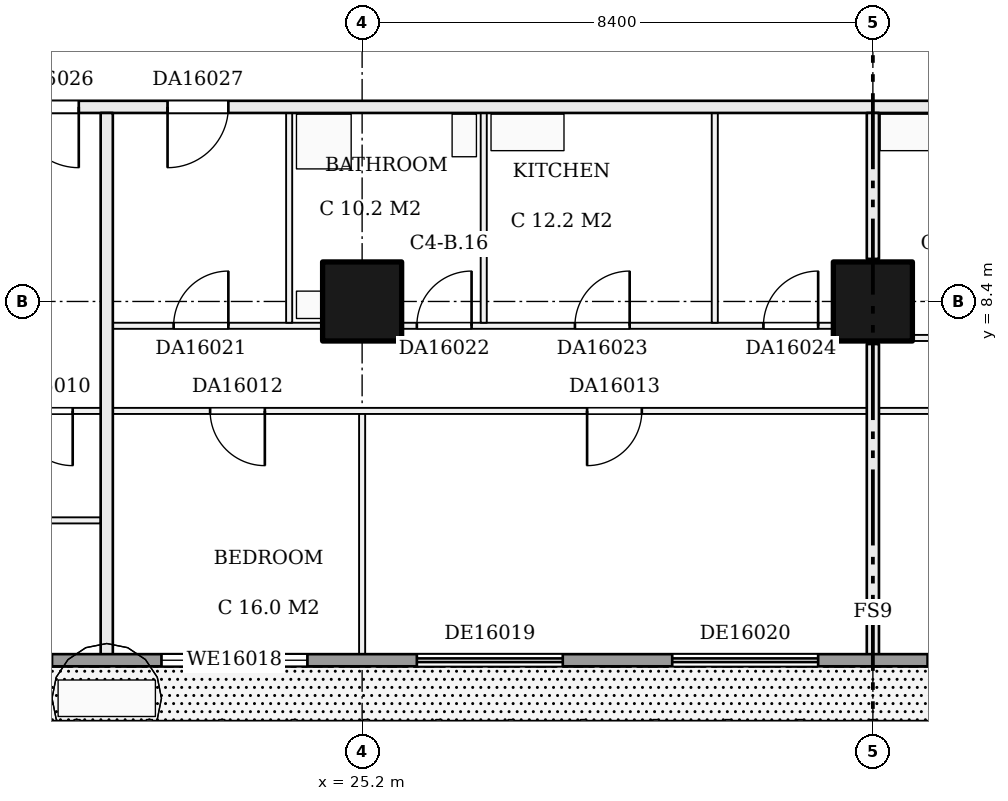
"""IFC4 building model, lengths in metres.
Left out: names, types, materials, properties, quantities, classifications, styles, units other than length and angle.
Written with IfcOpenShell. Run it as: python <this file> out.ifc"""

import sys

from ifc_helpers import new_model, si_unit, direction, frame, frame_2d, origin, origin_2d, place, context, subcontext, project, spatial, rectangle, extrude, element, fill, save


model = new_model("IFC4")
c1 = context("Model", 3, precision=1e-05, world=origin(), true_north=direction((0.0, 1.0)))
c2 = subcontext(c1, "Body", "Model", "MODEL_VIEW")
j1 = project(units=[si_unit("LENGTHUNIT", "METRE"), si_unit("PLANEANGLEUNIT", "RADIAN")], contexts=[c1])
p1 = place(None, origin())
s1 = spatial("IfcSite", under=j1, at=p1, CompositionType="ELEMENT")
p2 = place(p1, origin())
s2 = spatial("IfcBuilding", under=s1, at=p2, CompositionType="ELEMENT")
p3 = place(p2, frame((0.0, 0.0, 67.2)))
s3 = spatial("IfcBuildingStorey", under=s2, at=p3, CompositionType="ELEMENT", Elevation=67.2)
for number, where, z_axis, x_axis in (
    (1, (25.2, 8.4, 0.0), (0.0, 0.0, 1.0), (1.0, 0.0, 0.0)),
    (2, (33.6, 8.4, 0.0), (0.0, 0.0, 1.0), (1.0, 0.0, 0.0)),
):
    element("IfcColumn", number, at=place(p3, frame(where, z_axis=z_axis, x_axis=x_axis)), inside=s3, PredefinedType="COLUMN", context=c2, shape_type="SweptSolid", body=[
        extrude(rectangle(XDim=1.3, YDim=1.3, at=origin_2d()), origin(), (0.0, 0.0, 1.0), 3.22),
    ])
p4 = place(p3, frame((16.9, 4.8, 0.0), z_axis=(0.0, 0.0, 1.0), x_axis=(1.0, 0.0, 0.0)))
e3 = element("IfcWall", 3, at=p4, inside=s3, PredefinedType="PARTITIONING", context=c2, shape_type="SweptSolid", body=[
    extrude(rectangle(XDim=4.0, YDim=0.1, at=frame_2d((2.0, 0.0))), origin(), (0.0, 0.0, 1.0), 3.22),
])
p5 = place(p4, frame((1.5, 0.0, 0.0)))
e4 = element("IfcOpeningElement", 4, at=p5, cuts=e3, PredefinedType="OPENING", context=c2, shape_type="SweptSolid", body=[
    extrude(rectangle(XDim=0.9, YDim=2.1, at=frame_2d((0.45, 1.05))), frame((0.0, 0.06, 0.0), z_axis=(0.0, -1.0, 0.0), x_axis=(1.0, 0.0, 0.0)), (0.0, 0.0, 1.0), 0.12),
])
p6 = place(p3, frame((12.65, 6.6, 0.0), z_axis=(0.0, 0.0, 1.0), x_axis=(1.0, 0.0, 0.0)))
e5 = element("IfcWall", 5, at=p6, inside=s3, PredefinedType="PARTITIONING", context=c2, shape_type="SweptSolid", body=[
    extrude(rectangle(XDim=29.25, YDim=0.1, at=frame_2d((14.625, 0.0))), origin(), (0.0, 0.0, 1.0), 3.22),
])
p7 = place(p6, frame((1.65, 0.0, 0.0)))
e6 = element("IfcOpeningElement", 6, at=p7, cuts=e5, PredefinedType="OPENING", context=c2, shape_type="SweptSolid", body=[
    extrude(rectangle(XDim=0.9, YDim=2.1, at=frame_2d((0.45, 1.05))), frame((0.0, 0.06, 0.0), z_axis=(0.0, -1.0, 0.0), x_axis=(1.0, 0.0, 0.0)), (0.0, 0.0, 1.0), 0.12),
])
p8 = place(p6, frame((6.89, 0.0, 0.0)))
e7 = element("IfcOpeningElement", 7, at=p8, cuts=e5, PredefinedType="OPENING", context=c2, shape_type="SweptSolid", body=[
    extrude(rectangle(XDim=0.9, YDim=2.1, at=frame_2d((0.45, 1.05))), frame((0.0, 0.06, 0.0), z_axis=(0.0, -1.0, 0.0), x_axis=(1.0, 0.0, 0.0)), (0.0, 0.0, 1.0), 0.12),
])
p9 = place(p6, frame((4.85, 0.0, 0.0)))
e8 = element("IfcOpeningElement", 8, at=p9, cuts=e5, PredefinedType="OPENING", context=c2, shape_type="SweptSolid", body=[
    extrude(rectangle(XDim=0.9, YDim=2.1, at=frame_2d((0.45, 1.05))), frame((0.0, 0.06, 0.0), z_axis=(0.0, -1.0, 0.0), x_axis=(1.0, 0.0, 0.0)), (0.0, 0.0, 1.0), 0.12),
])
p10 = place(p6, frame((10.05, 0.0, 0.0)))
e9 = element("IfcOpeningElement", 9, at=p10, cuts=e5, PredefinedType="OPENING", context=c2, shape_type="SweptSolid", body=[
    extrude(rectangle(XDim=0.9, YDim=2.1, at=frame_2d((0.45, 1.05))), frame((0.0, 0.06, 0.0), z_axis=(0.0, -1.0, 0.0), x_axis=(1.0, 0.0, 0.0)), (0.0, 0.0, 1.0), 0.12),
])
p11 = place(p6, frame((16.25, 0.0, 0.0)))
e10 = element("IfcOpeningElement", 10, at=p11, cuts=e5, PredefinedType="OPENING", context=c2, shape_type="SweptSolid", body=[
    extrude(rectangle(XDim=0.9, YDim=2.1, at=frame_2d((0.45, 1.05))), frame((0.0, 0.06, 0.0), z_axis=(0.0, -1.0, 0.0), x_axis=(1.0, 0.0, 0.0)), (0.0, 0.0, 1.0), 0.12),
])
p12 = place(p6, frame((22.55, 0.0, 0.0)))
e11 = element("IfcOpeningElement", 11, at=p12, cuts=e5, PredefinedType="OPENING", context=c2, shape_type="SweptSolid", body=[
    extrude(rectangle(XDim=0.9, YDim=2.1, at=frame_2d((0.45, 1.05))), frame((0.0, 0.06, 0.0), z_axis=(0.0, -1.0, 0.0), x_axis=(1.0, 0.0, 0.0)), (0.0, 0.0, 1.0), 0.12),
])
p13 = place(p6, frame((26.75, 0.0, 0.0)))
e12 = element("IfcOpeningElement", 12, at=p13, cuts=e5, PredefinedType="OPENING", context=c2, shape_type="SweptSolid", body=[
    extrude(rectangle(XDim=0.9, YDim=2.1, at=frame_2d((0.45, 1.05))), frame((0.0, 0.06, 0.0), z_axis=(0.0, -1.0, 0.0), x_axis=(1.0, 0.0, 0.0)), (0.0, 0.0, 1.0), 0.12),
])
p14 = place(p3, frame((33.7, 7.8, 0.0), z_axis=(0.0, 0.0, 1.0), x_axis=(1.0, 0.0, 0.0)))
e13 = element("IfcWall", 13, at=p14, inside=s3, PredefinedType="PARTITIONING", context=c2, shape_type="SweptSolid", body=[
    extrude(rectangle(XDim=8.2, YDim=0.1, at=frame_2d((4.1, 0.0))), origin(), (0.0, 0.0, 1.0), 3.22),
])
p15 = place(p14, frame((6.633, 0.0, 0.0)))
e14 = element("IfcOpeningElement", 14, at=p15, cuts=e13, PredefinedType="OPENING", context=c2, shape_type="SweptSolid", body=[
    extrude(rectangle(XDim=0.9, YDim=2.1, at=frame_2d((0.45, 1.05))), frame((0.0, 0.06, 0.0), z_axis=(0.0, -1.0, 0.0), x_axis=(1.0, 0.0, 0.0)), (0.0, 0.0, 1.0), 0.12),
])
p16 = place(p14, frame((1.1, 0.0, 0.0)))
e15 = element("IfcOpeningElement", 15, at=p16, cuts=e13, PredefinedType="OPENING", context=c2, shape_type="SweptSolid", body=[
    extrude(rectangle(XDim=0.9, YDim=2.1, at=frame_2d((0.45, 1.05))), frame((0.0, 0.06, 0.0), z_axis=(0.0, -1.0, 0.0), x_axis=(1.0, 0.0, 0.0)), (0.0, 0.0, 1.0), 0.12),
])
p17 = place(p14, frame((4.067, 0.0, 0.0)))
e16 = element("IfcOpeningElement", 16, at=p17, cuts=e13, PredefinedType="OPENING", context=c2, shape_type="SweptSolid", body=[
    extrude(rectangle(XDim=0.9, YDim=2.1, at=frame_2d((0.45, 1.05))), frame((0.0, 0.06, 0.0), z_axis=(0.0, -1.0, 0.0), x_axis=(1.0, 0.0, 0.0)), (0.0, 0.0, 1.0), 0.12),
])
p18 = place(p3, frame((21.1, 8.0, 0.0), z_axis=(0.0, 0.0, 1.0), x_axis=(1.0, 0.0, 0.0)))
e17 = element("IfcWall", 17, at=p18, inside=s3, PredefinedType="PARTITIONING", context=c2, shape_type="SweptSolid", body=[
    extrude(rectangle(XDim=12.4, YDim=0.1, at=frame_2d((6.2, 0.0))), origin(), (0.0, 0.0, 1.0), 3.22),
])
p19 = place(p18, frame((1.0, 0.0, 0.0)))
e18 = element("IfcOpeningElement", 18, at=p19, cuts=e17, PredefinedType="OPENING", context=c2, shape_type="SweptSolid", body=[
    extrude(rectangle(XDim=0.9, YDim=2.1, at=frame_2d((0.45, 1.05))), frame((0.0, 0.06, 0.0), z_axis=(0.0, -1.0, 0.0), x_axis=(1.0, 0.0, 0.0)), (0.0, 0.0, 1.0), 0.12),
])
p20 = place(p18, frame((5.0, 0.0, 0.0)))
e19 = element("IfcOpeningElement", 19, at=p20, cuts=e17, PredefinedType="OPENING", context=c2, shape_type="SweptSolid", body=[
    extrude(rectangle(XDim=0.9, YDim=2.1, at=frame_2d((0.45, 1.05))), frame((0.0, 0.06, 0.0), z_axis=(0.0, -1.0, 0.0), x_axis=(1.0, 0.0, 0.0)), (0.0, 0.0, 1.0), 0.12),
])
p21 = place(p18, frame((7.6, 0.0, 0.0)))
e20 = element("IfcOpeningElement", 20, at=p21, cuts=e17, PredefinedType="OPENING", context=c2, shape_type="SweptSolid", body=[
    extrude(rectangle(XDim=0.9, YDim=2.1, at=frame_2d((0.45, 1.05))), frame((0.0, 0.06, 0.0), z_axis=(0.0, -1.0, 0.0), x_axis=(1.0, 0.0, 0.0)), (0.0, 0.0, 1.0), 0.12),
])
p22 = place(p18, frame((10.7, 0.0, 0.0)))
e21 = element("IfcOpeningElement", 21, at=p22, cuts=e17, PredefinedType="OPENING", context=c2, shape_type="SweptSolid", body=[
    extrude(rectangle(XDim=0.9, YDim=2.1, at=frame_2d((0.45, 1.05))), frame((0.0, 0.06, 0.0), z_axis=(0.0, -1.0, 0.0), x_axis=(1.0, 0.0, 0.0)), (0.0, 0.0, 1.0), 0.12),
])
p23 = place(p3, frame((11.5, 11.6, 0.0), z_axis=(0.0, 0.0, 1.0), x_axis=(1.0, 0.0, 0.0)))
e22 = element("IfcWall", 22, at=p23, inside=s3, PredefinedType="PARTITIONING", context=c2, shape_type="SweptSolid", body=[
    extrude(rectangle(XDim=30.5, YDim=0.2, at=frame_2d((15.25, 0.0))), origin(), (0.0, 0.0, 1.0), 3.22),
])
p24 = place(p23, frame((1.6, 0.0, 0.0)))
e23 = element("IfcOpeningElement", 23, at=p24, cuts=e22, PredefinedType="OPENING", context=c2, shape_type="SweptSolid", body=[
    extrude(rectangle(XDim=1.0, YDim=2.1, at=frame_2d((0.5, 1.05))), frame((0.0, 0.11, 0.0), z_axis=(0.0, -1.0, 0.0), x_axis=(1.0, 0.0, 0.0)), (0.0, 0.0, 1.0), 0.22),
])
p25 = place(p23, frame((8.04, 0.0, 0.0)))
e24 = element("IfcOpeningElement", 24, at=p25, cuts=e22, PredefinedType="OPENING", context=c2, shape_type="SweptSolid", body=[
    extrude(rectangle(XDim=1.0, YDim=2.1, at=frame_2d((0.5, 1.05))), frame((0.0, 0.11, 0.0), z_axis=(0.0, -1.0, 0.0), x_axis=(1.0, 0.0, 0.0)), (0.0, 0.0, 1.0), 0.22),
])
p26 = place(p23, frame((10.5, 0.0, 0.0)))
e25 = element("IfcOpeningElement", 25, at=p26, cuts=e22, PredefinedType="OPENING", context=c2, shape_type="SweptSolid", body=[
    extrude(rectangle(XDim=1.0, YDim=2.1, at=frame_2d((0.5, 1.05))), frame((0.0, 0.11, 0.0), z_axis=(0.0, -1.0, 0.0), x_axis=(1.0, 0.0, 0.0)), (0.0, 0.0, 1.0), 0.22),
])
p27 = place(p23, frame((28.733, 0.0, 0.0)))
e26 = element("IfcOpeningElement", 26, at=p27, cuts=e22, PredefinedType="OPENING", context=c2, shape_type="SweptSolid", body=[
    extrude(rectangle(XDim=1.0, YDim=2.1, at=frame_2d((0.5, 1.05))), frame((0.0, 0.11, 0.0), z_axis=(0.0, -1.0, 0.0), x_axis=(1.0, 0.0, 0.0)), (0.0, 0.0, 1.0), 0.22),
])
p28 = place(p3, frame((21.0, 2.5, 0.0), z_axis=(0.0, 0.0, 1.0), x_axis=(0.0, 1.0, 0.0)))
e27 = element("IfcWall", 27, at=p28, inside=s3, PredefinedType="PARTITIONING", context=c2, shape_type="SweptSolid", body=[
    extrude(rectangle(XDim=9.0, YDim=0.2, at=frame_2d((4.5, 0.0))), origin(), (0.0, 0.0, 1.0), 3.22),
])
p29 = place(p3, frame((24.0, 8.05, 0.0), z_axis=(0.0, 0.0, 1.0), x_axis=(0.0, 1.0, 0.0)))
e28 = element("IfcWall", 28, at=p29, inside=s3, PredefinedType="PARTITIONING", context=c2, shape_type="SweptSolid", body=[
    extrude(rectangle(XDim=3.45, YDim=0.1, at=frame_2d((1.725, 0.0))), origin(), (0.0, 0.0, 1.0), 3.22),
])
p30 = place(p3, frame((25.2, 2.5, 0.0), z_axis=(0.0, 0.0, 1.0), x_axis=(0.0, 1.0, 0.0)))
e29 = element("IfcWall", 29, at=p30, inside=s3, PredefinedType="PARTITIONING", context=c2, shape_type="SweptSolid", body=[
    extrude(rectangle(XDim=4.05, YDim=0.1, at=frame_2d((2.025, 0.0))), origin(), (0.0, 0.0, 1.0), 3.22),
])
for number, where, z_axis, x_axis in (
    (30, (27.2, 8.05, 0.0), (0.0, 0.0, 1.0), (0.0, 1.0, 0.0)),
    (31, (31.0, 8.05, 0.0), (0.0, 0.0, 1.0), (0.0, 1.0, 0.0)),
):
    element("IfcWall", number, at=place(p3, frame(where, z_axis=z_axis, x_axis=x_axis)), inside=s3, PredefinedType="PARTITIONING", context=c2, shape_type="SweptSolid", body=[
        extrude(rectangle(XDim=3.45, YDim=0.1, at=frame_2d((1.725, 0.0))), origin(), (0.0, 0.0, 1.0), 3.22),
    ])
p31 = place(p3, frame((33.6, 2.5, 0.0), z_axis=(0.0, 0.0, 1.0), x_axis=(0.0, 1.0, 0.0)))
e32 = element("IfcWall", 32, at=p31, inside=s3, PredefinedType="PARTITIONING", context=c2, shape_type="SweptSolid", body=[
    extrude(rectangle(XDim=5.2, YDim=0.2, at=frame_2d((2.6, 0.0))), origin(), (0.0, 0.0, 1.0), 3.22),
])
p32 = place(p3, frame((33.6, 9.1, 0.0), z_axis=(0.0, 0.0, 1.0), x_axis=(0.0, 1.0, 0.0)))
e33 = element("IfcWall", 33, at=p32, inside=s3, PredefinedType="PARTITIONING", context=c2, shape_type="SweptSolid", body=[
    extrude(rectangle(XDim=2.4, YDim=0.2, at=frame_2d((1.2, 0.0))), origin(), (0.0, 0.0, 1.0), 3.22),
])
p33 = place(p3, frame((4.8, 2.5, 0.0), z_axis=(0.0, 0.0, 1.0), x_axis=(1.0, 0.0, 0.0)))
e34 = element("IfcWall", 34, at=p33, inside=s3, PredefinedType="SOLIDWALL", context=c2, shape_type="SweptSolid", body=[
    extrude(rectangle(XDim=57.6, YDim=0.2, at=frame_2d((28.8, 0.0))), origin(), (0.0, 0.0, 1.0), 3.22),
])
p34 = place(p33, frame((0.3, 0.0, 0.0)))
e35 = element("IfcOpeningElement", 35, at=p34, cuts=e34, PredefinedType="OPENING", context=c2, shape_type="SweptSolid", body=[
    extrude(rectangle(XDim=2.4, YDim=2.2, at=frame_2d((1.2, 1.1))), frame((0.0, 0.11, 0.0), z_axis=(0.0, -1.0, 0.0), x_axis=(1.0, 0.0, 0.0)), (0.0, 0.0, 1.0), 0.22),
])
p35 = place(p33, frame((4.5, 0.0, 0.9)))
e36 = element("IfcOpeningElement", 36, at=p35, cuts=e34, PredefinedType="OPENING", context=c2, shape_type="SweptSolid", body=[
    extrude(rectangle(XDim=2.4, YDim=1.5, at=frame_2d((1.2, 0.75))), frame((0.0, 0.11, 0.0), z_axis=(0.0, -1.0, 0.0), x_axis=(1.0, 0.0, 0.0)), (0.0, 0.0, 1.0), 0.22),
])
p36 = place(p33, frame((8.7, 0.0, 0.9)))
e37 = element("IfcOpeningElement", 37, at=p36, cuts=e34, PredefinedType="OPENING", context=c2, shape_type="SweptSolid", body=[
    extrude(rectangle(XDim=2.4, YDim=1.5, at=frame_2d((1.2, 0.75))), frame((0.0, 0.11, 0.0), z_axis=(0.0, -1.0, 0.0), x_axis=(1.0, 0.0, 0.0)), (0.0, 0.0, 1.0), 0.22),
])
p37 = place(p33, frame((12.9, 0.0, 0.0)))
e38 = element("IfcOpeningElement", 38, at=p37, cuts=e34, PredefinedType="OPENING", context=c2, shape_type="SweptSolid", body=[
    extrude(rectangle(XDim=2.4, YDim=2.2, at=frame_2d((1.2, 1.1))), frame((0.0, 0.11, 0.0), z_axis=(0.0, -1.0, 0.0), x_axis=(1.0, 0.0, 0.0)), (0.0, 0.0, 1.0), 0.22),
])
p38 = place(p33, frame((17.1, 0.0, 0.9)))
e39 = element("IfcOpeningElement", 39, at=p38, cuts=e34, PredefinedType="OPENING", context=c2, shape_type="SweptSolid", body=[
    extrude(rectangle(XDim=2.4, YDim=1.5, at=frame_2d((1.2, 0.75))), frame((0.0, 0.11, 0.0), z_axis=(0.0, -1.0, 0.0), x_axis=(1.0, 0.0, 0.0)), (0.0, 0.0, 1.0), 0.22),
])
p39 = place(p33, frame((21.3, 0.0, 0.0)))
e40 = element("IfcOpeningElement", 40, at=p39, cuts=e34, PredefinedType="OPENING", context=c2, shape_type="SweptSolid", body=[
    extrude(rectangle(XDim=2.4, YDim=2.2, at=frame_2d((1.2, 1.1))), frame((0.0, 0.11, 0.0), z_axis=(0.0, -1.0, 0.0), x_axis=(1.0, 0.0, 0.0)), (0.0, 0.0, 1.0), 0.22),
])
p40 = place(p33, frame((25.5, 0.0, 0.0)))
e41 = element("IfcOpeningElement", 41, at=p40, cuts=e34, PredefinedType="OPENING", context=c2, shape_type="SweptSolid", body=[
    extrude(rectangle(XDim=2.4, YDim=2.2, at=frame_2d((1.2, 1.1))), frame((0.0, 0.11, 0.0), z_axis=(0.0, -1.0, 0.0), x_axis=(1.0, 0.0, 0.0)), (0.0, 0.0, 1.0), 0.22),
])
p41 = place(p33, frame((29.7, 0.0, 0.0)))
e42 = element("IfcOpeningElement", 42, at=p41, cuts=e34, PredefinedType="OPENING", context=c2, shape_type="SweptSolid", body=[
    extrude(rectangle(XDim=2.4, YDim=2.2, at=frame_2d((1.2, 1.1))), frame((0.0, 0.11, 0.0), z_axis=(0.0, -1.0, 0.0), x_axis=(1.0, 0.0, 0.0)), (0.0, 0.0, 1.0), 0.22),
])
p42 = place(p33, frame((33.9, 0.0, 0.9)))
e43 = element("IfcOpeningElement", 43, at=p42, cuts=e34, PredefinedType="OPENING", context=c2, shape_type="SweptSolid", body=[
    extrude(rectangle(XDim=2.4, YDim=1.5, at=frame_2d((1.2, 0.75))), frame((0.0, 0.11, 0.0), z_axis=(0.0, -1.0, 0.0), x_axis=(1.0, 0.0, 0.0)), (0.0, 0.0, 1.0), 0.22),
])
p43 = place(p33, frame((38.1, 0.0, 0.0)))
e44 = element("IfcOpeningElement", 44, at=p43, cuts=e34, PredefinedType="OPENING", context=c2, shape_type="SweptSolid", body=[
    extrude(rectangle(XDim=2.4, YDim=2.2, at=frame_2d((1.2, 1.1))), frame((0.0, 0.11, 0.0), z_axis=(0.0, -1.0, 0.0), x_axis=(1.0, 0.0, 0.0)), (0.0, 0.0, 1.0), 0.22),
])
p44 = place(p33, frame((42.3, 0.0, 0.9)))
e45 = element("IfcOpeningElement", 45, at=p44, cuts=e34, PredefinedType="OPENING", context=c2, shape_type="SweptSolid", body=[
    extrude(rectangle(XDim=2.4, YDim=1.5, at=frame_2d((1.2, 0.75))), frame((0.0, 0.11, 0.0), z_axis=(0.0, -1.0, 0.0), x_axis=(1.0, 0.0, 0.0)), (0.0, 0.0, 1.0), 0.22),
])
p45 = place(p33, frame((46.5, 0.0, 0.9)))
e46 = element("IfcOpeningElement", 46, at=p45, cuts=e34, PredefinedType="OPENING", context=c2, shape_type="SweptSolid", body=[
    extrude(rectangle(XDim=2.4, YDim=1.5, at=frame_2d((1.2, 0.75))), frame((0.0, 0.11, 0.0), z_axis=(0.0, -1.0, 0.0), x_axis=(1.0, 0.0, 0.0)), (0.0, 0.0, 1.0), 0.22),
])
p46 = place(p33, frame((50.7, 0.0, 0.0)))
e47 = element("IfcOpeningElement", 47, at=p46, cuts=e34, PredefinedType="OPENING", context=c2, shape_type="SweptSolid", body=[
    extrude(rectangle(XDim=2.4, YDim=2.2, at=frame_2d((1.2, 1.1))), frame((0.0, 0.11, 0.0), z_axis=(0.0, -1.0, 0.0), x_axis=(1.0, 0.0, 0.0)), (0.0, 0.0, 1.0), 0.22),
])
p47 = place(p33, frame((54.9, 0.0, 0.9)))
e48 = element("IfcOpeningElement", 48, at=p47, cuts=e34, PredefinedType="OPENING", context=c2, shape_type="SweptSolid", body=[
    extrude(rectangle(XDim=2.4, YDim=1.5, at=frame_2d((1.2, 0.75))), frame((0.0, 0.11, 0.0), z_axis=(0.0, -1.0, 0.0), x_axis=(1.0, 0.0, 0.0)), (0.0, 0.0, 1.0), 0.22),
])
p48 = place(p8, frame((0.9, 0.0, 0.0), z_axis=(0.0, 0.0, 1.0), x_axis=(-1.0, 0.0, 0.0)))
e49 = element("IfcDoor", 49, at=p48, inside=s3, OperationType="SINGLE_SWING_LEFT", PredefinedType="DOOR", context=c2, shape_type="SweptSolid", body=[
    extrude(rectangle(XDim=0.9, YDim=2.1, at=frame_2d((0.45, 1.05))), frame((0.0, 0.025, 0.0), z_axis=(0.0, -1.0, 0.0), x_axis=(1.0, 0.0, 0.0)), (0.0, 0.0, 1.0), 0.05),
])
fill(e7, e49)
p49 = place(p10, frame((0.9, 0.0, 0.0), z_axis=(0.0, 0.0, 1.0), x_axis=(-1.0, 0.0, 0.0)))
e50 = element("IfcDoor", 50, at=p49, inside=s3, OperationType="SINGLE_SWING_LEFT", PredefinedType="DOOR", context=c2, shape_type="SweptSolid", body=[
    extrude(rectangle(XDim=0.9, YDim=2.1, at=frame_2d((0.45, 1.05))), frame((0.0, 0.025, 0.0), z_axis=(0.0, -1.0, 0.0), x_axis=(1.0, 0.0, 0.0)), (0.0, 0.0, 1.0), 0.05),
])
fill(e9, e50)
p50 = place(p11, frame((0.9, 0.0, 0.0), z_axis=(0.0, 0.0, 1.0), x_axis=(-1.0, 0.0, 0.0)))
e51 = element("IfcDoor", 51, at=p50, inside=s3, OperationType="SINGLE_SWING_RIGHT", PredefinedType="DOOR", context=c2, shape_type="SweptSolid", body=[
    extrude(rectangle(XDim=0.9, YDim=2.1, at=frame_2d((0.45, 1.05))), frame((0.0, 0.025, 0.0), z_axis=(0.0, -1.0, 0.0), x_axis=(1.0, 0.0, 0.0)), (0.0, 0.0, 1.0), 0.05),
])
fill(e10, e51)
p51 = place(p19, origin())
e52 = element("IfcDoor", 52, at=p51, inside=s3, OperationType="SINGLE_SWING_RIGHT", PredefinedType="DOOR", context=c2, shape_type="SweptSolid", body=[
    extrude(rectangle(XDim=0.9, YDim=2.1, at=frame_2d((0.45, 1.05))), frame((0.0, 0.025, 0.0), z_axis=(0.0, -1.0, 0.0), x_axis=(1.0, 0.0, 0.0)), (0.0, 0.0, 1.0), 0.05),
])
fill(e18, e52)
p52 = place(p20, origin())
e53 = element("IfcDoor", 53, at=p52, inside=s3, OperationType="SINGLE_SWING_RIGHT", PredefinedType="DOOR", context=c2, shape_type="SweptSolid", body=[
    extrude(rectangle(XDim=0.9, YDim=2.1, at=frame_2d((0.45, 1.05))), frame((0.0, 0.025, 0.0), z_axis=(0.0, -1.0, 0.0), x_axis=(1.0, 0.0, 0.0)), (0.0, 0.0, 1.0), 0.05),
])
fill(e19, e53)
p53 = place(p21, origin())
e54 = element("IfcDoor", 54, at=p53, inside=s3, OperationType="SINGLE_SWING_RIGHT", PredefinedType="DOOR", context=c2, shape_type="SweptSolid", body=[
    extrude(rectangle(XDim=0.9, YDim=2.1, at=frame_2d((0.45, 1.05))), frame((0.0, 0.025, 0.0), z_axis=(0.0, -1.0, 0.0), x_axis=(1.0, 0.0, 0.0)), (0.0, 0.0, 1.0), 0.05),
])
fill(e20, e54)
p54 = place(p22, origin())
e55 = element("IfcDoor", 55, at=p54, inside=s3, OperationType="SINGLE_SWING_RIGHT", PredefinedType="DOOR", context=c2, shape_type="SweptSolid", body=[
    extrude(rectangle(XDim=0.9, YDim=2.1, at=frame_2d((0.45, 1.05))), frame((0.0, 0.025, 0.0), z_axis=(0.0, -1.0, 0.0), x_axis=(1.0, 0.0, 0.0)), (0.0, 0.0, 1.0), 0.05),
])
fill(e21, e55)
p55 = place(p25, frame((1.0, 0.0, 0.0), z_axis=(0.0, 0.0, 1.0), x_axis=(-1.0, 0.0, 0.0)))
e56 = element("IfcDoor", 56, at=p55, inside=s3, OperationType="SINGLE_SWING_LEFT", PredefinedType="DOOR", context=c2, shape_type="SweptSolid", body=[
    extrude(rectangle(XDim=1.0, YDim=2.1, at=frame_2d((0.5, 1.05))), frame((0.0, 0.025, 0.0), z_axis=(0.0, -1.0, 0.0), x_axis=(1.0, 0.0, 0.0)), (0.0, 0.0, 1.0), 0.05),
])
fill(e24, e56)
p56 = place(p26, frame((1.0, 0.0, 0.0), z_axis=(0.0, 0.0, 1.0), x_axis=(-1.0, 0.0, 0.0)))
e57 = element("IfcDoor", 57, at=p56, inside=s3, OperationType="SINGLE_SWING_RIGHT", PredefinedType="DOOR", context=c2, shape_type="SweptSolid", body=[
    extrude(rectangle(XDim=1.0, YDim=2.1, at=frame_2d((0.5, 1.05))), frame((0.0, 0.025, 0.0), z_axis=(0.0, -1.0, 0.0), x_axis=(1.0, 0.0, 0.0)), (0.0, 0.0, 1.0), 0.05),
])
fill(e25, e57)
p57 = place(p38, origin())
e58 = element("IfcWindow", 58, at=p57, inside=s3, PartitioningType="SINGLE_PANEL", PredefinedType="WINDOW", context=c2, shape_type="SweptSolid", body=[
    extrude(rectangle(XDim=2.4, YDim=1.5, at=frame_2d((1.2, 0.75))), frame((0.0, 0.03, 0.0), z_axis=(0.0, -1.0, 0.0), x_axis=(1.0, 0.0, 0.0)), (0.0, 0.0, 1.0), 0.06),
])
fill(e39, e58)
p58 = place(p39, origin())
e59 = element("IfcDoor", 59, at=p58, inside=s3, OperationType="DOUBLE_DOOR_SLIDING", PredefinedType="DOOR", context=c2, shape_type="SweptSolid", body=[
    extrude(rectangle(XDim=2.4, YDim=2.2, at=frame_2d((1.2, 1.1))), frame((0.0, 0.025, 0.0), z_axis=(0.0, -1.0, 0.0), x_axis=(1.0, 0.0, 0.0)), (0.0, 0.0, 1.0), 0.05),
])
fill(e40, e59)
p59 = place(p40, origin())
e60 = element("IfcDoor", 60, at=p59, inside=s3, OperationType="DOUBLE_DOOR_SLIDING", PredefinedType="DOOR", context=c2, shape_type="SweptSolid", body=[
    extrude(rectangle(XDim=2.4, YDim=2.2, at=frame_2d((1.2, 1.1))), frame((0.0, 0.025, 0.0), z_axis=(0.0, -1.0, 0.0), x_axis=(1.0, 0.0, 0.0)), (0.0, 0.0, 1.0), 0.05),
])
fill(e41, e60)
save(model, sys.argv[1])
